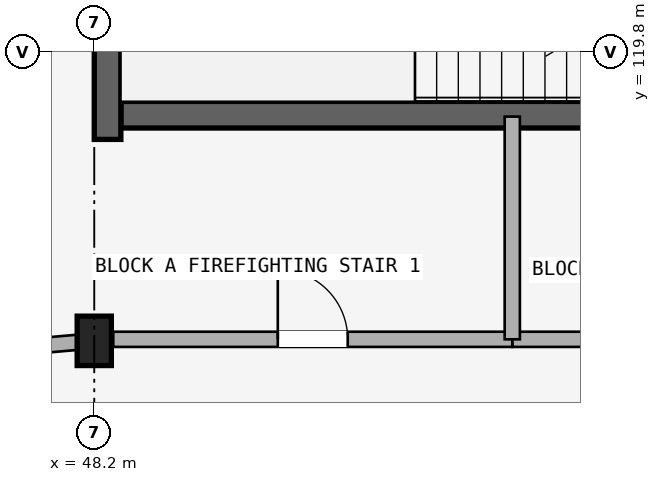
"""IFC4 building model, lengths in metres.
Left out: names, types, materials, properties, quantities, classifications, styles, units other than length and angle.
Written with IfcOpenShell. Run it as: python <this file> out.ifc"""

import sys

from ifc_helpers import new_model, si_unit, direction, frame, frame_2d, origin, origin_2d, place, context, subcontext, project, spatial, rectangle, extrude, element, fill, save


model = new_model("IFC4")
c1 = context("Model", 3, precision=1e-05, world=origin(), true_north=direction((0.0, 1.0)))
c2 = subcontext(c1, "Body", "Model", "MODEL_VIEW")
j1 = project(units=[si_unit("LENGTHUNIT", "METRE"), si_unit("PLANEANGLEUNIT", "RADIAN")], contexts=[c1])
p1 = place(None, origin())
s1 = spatial("IfcSite", under=j1, at=p1, CompositionType="ELEMENT")
p2 = place(p1, origin())
s2 = spatial("IfcBuilding", under=s1, at=p2, CompositionType="ELEMENT")
p3 = place(p2, frame((0.0, 0.0, 27.6)))
s3 = spatial("IfcBuildingStorey", under=s2, at=p3, CompositionType="ELEMENT", Elevation=27.6)
p4 = place(p3, frame((48.55, 118.975, 0.0), z_axis=(0.0, 0.0, 1.0), x_axis=(1.0, 0.0, 0.0)))
e1 = element("IfcWall", 1, at=p4, inside=s3, PredefinedType="SHEAR", context=c2, shape_type="SweptSolid", body=[
    extrude(rectangle(XDim=8.075, YDim=0.35, at=frame_2d((4.038, 0.0))), origin(), (0.0, 0.0, 1.0), 2.93),
])
p5 = place(p4, frame((6.38, 0.0, 0.0)))
e2 = element("IfcOpeningElement", 2, at=p5, cuts=e1, PredefinedType="OPENING", context=c2, shape_type="SweptSolid", body=[
    extrude(rectangle(XDim=1.24, YDim=2.15, at=frame_2d((0.62, 1.075))), frame((0.0, 0.185, 0.0), z_axis=(0.0, -1.0, 0.0), x_axis=(1.0, 0.0, 0.0)), (0.0, 0.0, 1.0), 0.37),
])
p6 = place(p3, frame((48.375, 118.65, 0.0), z_axis=(0.0, 0.0, 1.0), x_axis=(0.0, 1.0, 0.0)))
e3 = element("IfcWall", 3, at=p6, inside=s3, PredefinedType="SHEAR", context=c2, shape_type="SweptSolid", body=[
    extrude(rectangle(XDim=3.6, YDim=0.35, at=frame_2d((1.8, 0.0))), origin(), (0.0, 0.0, 1.0), 2.93),
])
p7 = place(p3, frame((48.2, 116.0, 0.0), z_axis=(0.0, 0.0, 1.0), x_axis=(1.0, 0.0, 0.0)))
e4 = element("IfcColumn", 4, at=p7, inside=s3, PredefinedType="COLUMN", context=c2, shape_type="SweptSolid", body=[
    extrude(rectangle(XDim=0.45, YDim=0.65, at=origin_2d()), origin(), (0.0, 0.0, 1.0), 2.93),
])
p8 = place(p3, frame((53.7, 116.02, 0.0), z_axis=(0.0, 0.0, 1.0), x_axis=(1.0, 0.0, 0.0)))
e5 = element("IfcWall", 5, at=p8, inside=s3, PredefinedType="STANDARD", context=c2, shape_type="SweptSolid", body=[
    extrude(rectangle(XDim=5.65, YDim=0.2, at=frame_2d((2.825, 0.0))), origin(), (0.0, 0.0, 1.0), 2.372),
])
p9 = place(p8, frame((1.923, 0.0, 0.0)))
e6 = element("IfcOpeningElement", 6, at=p9, cuts=e5, PredefinedType="OPENING", context=c2, shape_type="SweptSolid", body=[
    extrude(rectangle(XDim=1.24, YDim=2.15, at=frame_2d((0.62, 1.075))), frame((0.0, 0.11, 0.0), z_axis=(0.0, -1.0, 0.0), x_axis=(1.0, 0.0, 0.0)), (0.0, 0.0, 1.0), 0.22),
])
p10 = place(p3, frame((48.45, 116.02, 0.0), z_axis=(0.0, 0.0, 1.0), x_axis=(1.0, 0.0, 0.0)))
e7 = element("IfcWall", 7, at=p10, inside=s3, PredefinedType="STANDARD", context=c2, shape_type="SweptSolid", body=[
    extrude(rectangle(XDim=5.25, YDim=0.2, at=frame_2d((2.625, 0.0))), origin(), (0.0, 0.0, 1.0), 2.372),
])
p11 = place(p10, frame((2.165, 0.0, 0.0)))
e8 = element("IfcOpeningElement", 8, at=p11, cuts=e7, PredefinedType="OPENING", context=c2, shape_type="SweptSolid", body=[
    extrude(rectangle(XDim=0.92, YDim=2.1, at=frame_2d((0.46, 1.05))), frame((0.0, 0.11, 0.0), z_axis=(0.0, -1.0, 0.0), x_axis=(1.0, 0.0, 0.0)), (0.0, 0.0, 1.0), 0.22),
])
p12 = place(p3, frame((53.7, 116.02, 0.0), z_axis=(0.0, 0.0, 1.0), x_axis=(0.0, 1.0, 0.0)))
e9 = element("IfcWall", 9, at=p12, inside=s3, PredefinedType="STANDARD", context=c2, shape_type="SweptSolid", body=[
    extrude(rectangle(XDim=2.93, YDim=0.2, at=frame_2d((1.465, 0.0))), origin(), (0.0, 0.0, 1.0), 2.372),
])
p13 = place(p3, frame((48.2, 116.0, 0.0), z_axis=(0.0, 0.0, 1.0), x_axis=(-0.996193663584, -0.087167566415, 0.0)))
e10 = element("IfcWall", 10, at=p13, inside=s3, PredefinedType="STANDARD", context=c2, shape_type="SweptSolid", body=[
    extrude(rectangle(XDim=4.916, YDim=0.2, at=frame_2d((2.458, 0.0))), origin(), (0.0, 0.0, 1.0), 2.372),
])
p14 = place(p13, frame((1.918, 0.0, 0.0)))
e11 = element("IfcOpeningElement", 11, at=p14, cuts=e10, PredefinedType="OPENING", context=c2, shape_type="SweptSolid", body=[
    extrude(rectangle(XDim=1.08, YDim=2.15, at=frame_2d((0.54, 1.075))), frame((0.0, 0.11, 0.0), z_axis=(0.0, -1.0, 0.0), x_axis=(1.0, 0.0, 0.0)), (0.0, 0.0, 1.0), 0.22),
])
p15 = place(p11, frame((0.92, 0.0, 0.0), z_axis=(0.0, 0.0, 1.0), x_axis=(-1.0, 0.0, 0.0)))
e12 = element("IfcDoor", 12, at=p15, inside=s3, OperationType="SINGLE_SWING_RIGHT", PredefinedType="DOOR", context=c2, shape_type="SweptSolid", body=[
    extrude(rectangle(XDim=0.92, YDim=2.1, at=frame_2d((0.46, 1.05))), frame((0.0, 0.025, 0.0), z_axis=(0.0, -1.0, 0.0), x_axis=(1.0, 0.0, 0.0)), (0.0, 0.0, 1.0), 0.05),
])
fill(e8, e12)
save(model, sys.argv[1])
